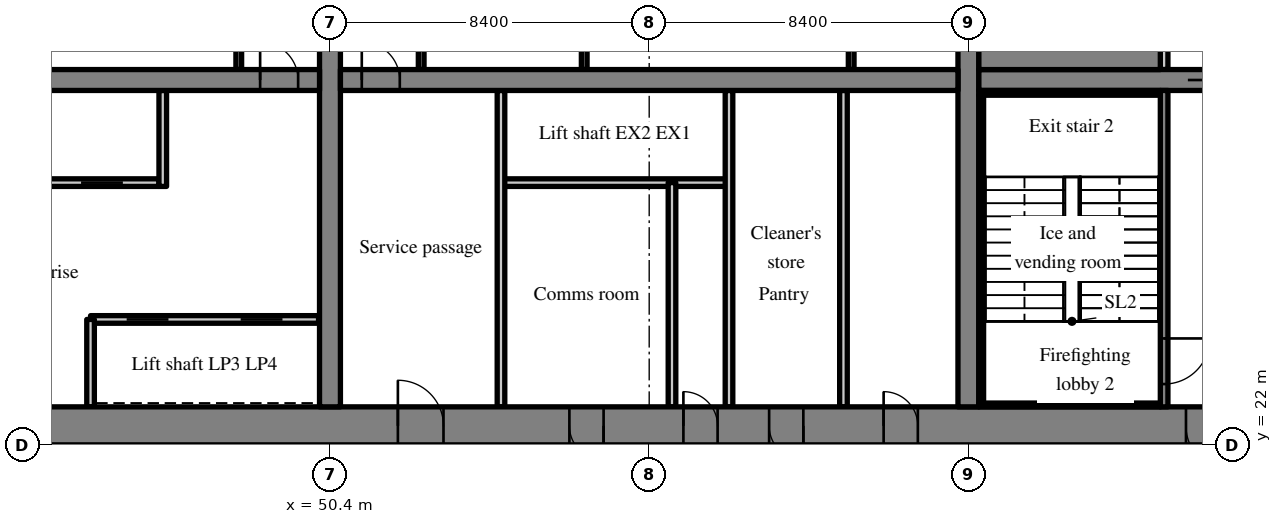
"""IFC4 building model, lengths in metres.
Left out: names, types, materials, properties, quantities, classifications, styles, units other than length and angle.
Written with IfcOpenShell. Run it as: python <this file> out.ifc"""

import sys

from ifc_helpers import new_model, si_unit, direction, frame, frame_2d, origin, place, context, subcontext, project, spatial, rectangle, extrude, source, transform, mapped, element, fill, save


model = new_model("IFC4")
c1 = context("Model", 3, precision=1e-05, world=origin(), true_north=direction((0.0, 1.0)))
c2 = subcontext(c1, "Body", "Model", "MODEL_VIEW")
j1 = project(units=[si_unit("LENGTHUNIT", "METRE"), si_unit("PLANEANGLEUNIT", "RADIAN")], contexts=[c1])
p1 = place(None, origin())
s1 = spatial("IfcSite", under=j1, at=p1, CompositionType="ELEMENT")
p2 = place(p1, origin())
s2 = spatial("IfcBuilding", under=s1, at=p2, CompositionType="ELEMENT")
p3 = place(p2, frame((0.0, 0.0, 58.2)))
s3 = spatial("IfcBuildingStorey", under=s2, at=p3, CompositionType="ELEMENT", Elevation=58.2)
m1 = source(origin(), c2, "Body", "SweptSolid", [
    extrude(rectangle(XDim=50.4, YDim=1.0, at=frame_2d((25.2, 0.0))), origin(), (0.0, 0.0, 1.0), 3.52),
])
p4 = place(p3, frame((25.2, 22.5, 0.0), z_axis=(0.0, 0.0, 1.0), x_axis=(1.0, 0.0, 0.0)))
e1 = element("IfcWall", 1, at=p4, inside=s3, PredefinedType="SHEAR", context=c2, shape_type="MappedRepresentation", body=[
    mapped(m1, transform((0.0, 0.0, 0.0), scale=1.0)),
])
m2 = source(origin(), c2, "Body", "SweptSolid", [
    extrude(rectangle(XDim=1.8, YDim=2.1, at=frame_2d((0.9, 1.05))), frame((0.0, 0.51, 0.0), z_axis=(0.0, -1.0, 0.0), x_axis=(1.0, 0.0, 0.0)), (0.0, 0.0, 1.0), 1.02),
])
p5 = place(p4, frame((15.9, 0.0, 0.0)))
e2 = element("IfcOpeningElement", 2, at=p5, cuts=e1, PredefinedType="OPENING", context=c2, shape_type="MappedRepresentation", body=[
    mapped(m2, transform((0.0, 0.0, 0.0), scale=1.0)),
])
m3 = source(origin(), c2, "Body", "SweptSolid", [
    extrude(rectangle(XDim=1.2, YDim=2.1, at=frame_2d((0.6, 1.05))), frame((0.0, 0.51, 0.0), z_axis=(0.0, -1.0, 0.0), x_axis=(1.0, 0.0, 0.0)), (0.0, 0.0, 1.0), 1.02),
])
p6 = place(p4, frame((26.987, 0.0, 0.0)))
e3 = element("IfcOpeningElement", 3, at=p6, cuts=e1, PredefinedType="OPENING", context=c2, shape_type="MappedRepresentation", body=[
    mapped(m3, transform((0.0, 0.0, 0.0), scale=1.0)),
])
m4 = source(origin(), c2, "Body", "SweptSolid", [
    extrude(rectangle(XDim=0.9, YDim=2.1, at=frame_2d((0.45, 1.05))), frame((0.0, 0.51, 0.0), z_axis=(0.0, -1.0, 0.0), x_axis=(1.0, 0.0, 0.0)), (0.0, 0.0, 1.0), 1.02),
])
p7 = place(p4, frame((34.5, 0.0, 0.0)))
e4 = element("IfcOpeningElement", 4, at=p7, cuts=e1, PredefinedType="OPENING", context=c2, shape_type="MappedRepresentation", body=[
    mapped(m4, transform((0.0, 0.0, 0.0), scale=1.0)),
])
p8 = place(p4, frame((31.5, 0.0, 0.0)))
e5 = element("IfcOpeningElement", 5, at=p8, cuts=e1, PredefinedType="OPENING", context=c2, shape_type="MappedRepresentation", body=[
    mapped(m4, transform((0.0, 0.0, 0.0), scale=1.0)),
])
p9 = place(p4, frame((39.769, 0.0, 0.0)))
e6 = element("IfcOpeningElement", 6, at=p9, cuts=e1, PredefinedType="OPENING", context=c2, shape_type="MappedRepresentation", body=[
    mapped(m4, transform((0.0, 0.0, 0.0), scale=1.0)),
])
p10 = place(p4, frame((36.756, 0.0, 0.0)))
e7 = element("IfcOpeningElement", 7, at=p10, cuts=e1, PredefinedType="OPENING", context=c2, shape_type="MappedRepresentation", body=[
    mapped(m4, transform((0.0, 0.0, 0.0), scale=1.0)),
])
p11 = place(p4, frame((6.438, 0.0, 0.0)))
e8 = element("IfcOpeningElement", 8, at=p11, cuts=e1, PredefinedType="OPENING", context=c2, shape_type="MappedRepresentation", body=[
    mapped(m3, transform((0.0, 0.0, 0.0), scale=1.0)),
])
p12 = place(p4, frame((47.725, 0.0, 0.0)))
e9 = element("IfcOpeningElement", 9, at=p12, cuts=e1, PredefinedType="OPENING", context=c2, shape_type="MappedRepresentation", body=[
    mapped(m3, transform((0.0, 0.0, 0.0), scale=1.0)),
])
m5 = source(origin(), c2, "Body", "SweptSolid", [
    extrude(rectangle(XDim=18.0, YDim=0.55, at=frame_2d((9.0, 0.0))), origin(), (0.0, 0.0, 1.0), 3.52),
])
p13 = place(p3, frame((50.4, 23.0, 0.0), z_axis=(0.0, 0.0, 1.0), x_axis=(0.0, 1.0, 0.0)))
e10 = element("IfcWall", 10, at=p13, inside=s3, PredefinedType="SHEAR", context=c2, shape_type="MappedRepresentation", body=[
    mapped(m5, transform((0.0, 0.0, 0.0), scale=1.0)),
])
m6 = source(origin(), c2, "Body", "SweptSolid", [
    extrude(rectangle(XDim=1.1, YDim=2.1, at=frame_2d((0.55, 1.05))), frame((0.0, 0.285, 0.0), z_axis=(0.0, -1.0, 0.0), x_axis=(1.0, 0.0, 0.0)), (0.0, 0.0, 1.0), 0.57),
])
p14 = place(p13, frame((12.45, 0.0, 0.0)))
e11 = element("IfcOpeningElement", 11, at=p14, cuts=e10, PredefinedType="OPENING", context=c2, shape_type="MappedRepresentation", body=[
    mapped(m6, transform((0.0, 0.0, 0.0), scale=1.0)),
])
p15 = place(p3, frame((67.2, 23.0, 0.0), z_axis=(0.0, 0.0, 1.0), x_axis=(0.0, 1.0, 0.0)))
e12 = element("IfcWall", 12, at=p15, inside=s3, PredefinedType="SHEAR", context=c2, shape_type="MappedRepresentation", body=[
    mapped(m5, transform((0.0, 0.0, 0.0), scale=1.0)),
])
m7 = source(origin(), c2, "Body", "SweptSolid", [
    extrude(rectangle(XDim=16.25, YDim=0.55, at=frame_2d((8.125, 0.0))), origin(), (0.0, 0.0, 1.0), 3.52),
])
p16 = place(p3, frame((33.875, 31.6, 0.0), z_axis=(0.0, 0.0, 1.0), x_axis=(1.0, 0.0, 0.0)))
e13 = element("IfcWall", 13, at=p16, inside=s3, PredefinedType="SHEAR", context=c2, shape_type="MappedRepresentation", body=[
    mapped(m7, transform((0.0, 0.0, 0.0), scale=1.0)),
])
m8 = source(origin(), c2, "Body", "SweptSolid", [
    extrude(rectangle(XDim=1.0, YDim=2.1, at=frame_2d((0.5, 1.05))), frame((0.0, 0.285, 0.0), z_axis=(0.0, -1.0, 0.0), x_axis=(1.0, 0.0, 0.0)), (0.0, 0.0, 1.0), 0.57),
])
p17 = place(p16, frame((14.687, 0.0, 0.0)))
e14 = element("IfcOpeningElement", 14, at=p17, cuts=e13, PredefinedType="OPENING", context=c2, shape_type="MappedRepresentation", body=[
    mapped(m8, transform((0.0, 0.0, 0.0), scale=1.0)),
])
p18 = place(p3, frame((50.675, 31.6, 0.0), z_axis=(0.0, 0.0, 1.0), x_axis=(1.0, 0.0, 0.0)))
e15 = element("IfcWall", 15, at=p18, inside=s3, PredefinedType="SHEAR", context=c2, shape_type="MappedRepresentation", body=[
    mapped(m7, transform((0.0, 0.0, 0.0), scale=1.0)),
])
p19 = place(p18, frame((0.562, 0.0, 0.0)))
e16 = element("IfcOpeningElement", 16, at=p19, cuts=e15, PredefinedType="OPENING", context=c2, shape_type="MappedRepresentation", body=[
    mapped(m8, transform((0.0, 0.0, 0.0), scale=1.0)),
])
m9 = source(origin(), c2, "Body", "SweptSolid", [
    extrude(rectangle(XDim=7.125, YDim=0.55, at=frame_2d((3.562, 0.0))), origin(), (0.0, 0.0, 1.0), 3.52),
])
p20 = place(p3, frame((67.475, 31.6, 0.0), z_axis=(0.0, 0.0, 1.0), x_axis=(1.0, 0.0, 0.0)))
e17 = element("IfcWall", 17, at=p20, inside=s3, PredefinedType="SHEAR", context=c2, shape_type="MappedRepresentation", body=[
    mapped(m9, transform((0.0, 0.0, 0.0), scale=1.0)),
])
p21 = place(p20, frame((5.5, 0.0, 0.0)))
e18 = element("IfcOpeningElement", 18, at=p21, cuts=e17, PredefinedType="OPENING", context=c2, shape_type="MappedRepresentation", body=[
    mapped(m6, transform((0.0, 0.0, 0.0), scale=1.0)),
])
m10 = source(origin(), c2, "Body", "SweptSolid", [
    extrude(rectangle(XDim=6.0, YDim=0.2, at=frame_2d((3.0, 0.0))), origin(), (0.0, 0.0, 1.0), 3.52),
])
p22 = place(p3, frame((44.1, 25.3, 0.0), z_axis=(0.0, 0.0, 1.0), x_axis=(1.0, 0.0, 0.0)))
e19 = element("IfcWall", 19, at=p22, inside=s3, PredefinedType="SOLIDWALL", context=c2, shape_type="MappedRepresentation", body=[
    mapped(m10, transform((0.0, 0.0, 0.0), scale=1.0)),
])
m11 = source(origin(), c2, "Body", "SweptSolid", [
    extrude(rectangle(XDim=1.1, YDim=2.1, at=frame_2d((0.55, 1.05))), frame((0.0, 0.11, 0.0), z_axis=(0.0, -1.0, 0.0), x_axis=(1.0, 0.0, 0.0)), (0.0, 0.0, 1.0), 0.22),
])
p23 = place(p22, frame((0.95, 0.0, 0.0)))
e20 = element("IfcOpeningElement", 20, at=p23, cuts=e19, PredefinedType="OPENING", context=c2, shape_type="MappedRepresentation", body=[
    mapped(m11, transform((0.0, 0.0, 0.0), scale=1.0)),
])
p24 = place(p22, frame((3.95, 0.0, 0.0)))
e21 = element("IfcOpeningElement", 21, at=p24, cuts=e19, PredefinedType="OPENING", context=c2, shape_type="MappedRepresentation", body=[
    mapped(m11, transform((0.0, 0.0, 0.0), scale=1.0)),
])
m12 = source(origin(), c2, "Body", "SweptSolid", [
    extrude(rectangle(XDim=12.025, YDim=0.2, at=frame_2d((6.012, 0.0))), origin(), (0.0, 0.0, 1.0), 3.52),
])
p25 = place(p3, frame((33.875, 28.9, 0.0), z_axis=(0.0, 0.0, 1.0), x_axis=(1.0, 0.0, 0.0)))
e22 = element("IfcWall", 22, at=p25, inside=s3, PredefinedType="SOLIDWALL", context=c2, shape_type="MappedRepresentation", body=[
    mapped(m12, transform((0.0, 0.0, 0.0), scale=1.0)),
])
p26 = place(p25, frame((0.975, 0.0, 0.0)))
e23 = element("IfcOpeningElement", 23, at=p26, cuts=e22, PredefinedType="OPENING", context=c2, shape_type="MappedRepresentation", body=[
    mapped(m11, transform((0.0, 0.0, 0.0), scale=1.0)),
])
p27 = place(p25, frame((3.975, 0.0, 0.0)))
e24 = element("IfcOpeningElement", 24, at=p27, cuts=e22, PredefinedType="OPENING", context=c2, shape_type="MappedRepresentation", body=[
    mapped(m11, transform((0.0, 0.0, 0.0), scale=1.0)),
])
p28 = place(p25, frame((6.975, 0.0, 0.0)))
e25 = element("IfcOpeningElement", 25, at=p28, cuts=e22, PredefinedType="OPENING", context=c2, shape_type="MappedRepresentation", body=[
    mapped(m11, transform((0.0, 0.0, 0.0), scale=1.0)),
])
p29 = place(p25, frame((9.975, 0.0, 0.0)))
e26 = element("IfcOpeningElement", 26, at=p29, cuts=e22, PredefinedType="OPENING", context=c2, shape_type="MappedRepresentation", body=[
    mapped(m11, transform((0.0, 0.0, 0.0), scale=1.0)),
])
m13 = source(origin(), c2, "Body", "SweptSolid", [
    extrude(rectangle(XDim=2.3, YDim=0.2, at=frame_2d((1.15, 0.0))), origin(), (0.0, 0.0, 1.0), 3.52),
])
p30 = place(p3, frame((44.1, 23.0, 0.0), z_axis=(0.0, 0.0, 1.0), x_axis=(0.0, 1.0, 0.0)))
e27 = element("IfcWall", 27, at=p30, inside=s3, PredefinedType="SOLIDWALL", context=c2, shape_type="MappedRepresentation", body=[
    mapped(m13, transform((0.0, 0.0, 0.0), scale=1.0)),
])
m14 = source(origin(), c2, "Body", "SweptSolid", [
    extrude(rectangle(XDim=2.525, YDim=0.2, at=frame_2d((1.262, 0.0))), origin(), (0.0, 0.0, 1.0), 3.52),
])
p31 = place(p3, frame((46.0, 28.8, 0.0), z_axis=(0.0, 0.0, 1.0), x_axis=(0.0, 1.0, 0.0)))
e28 = element("IfcWall", 28, at=p31, inside=s3, PredefinedType="SOLIDWALL", context=c2, shape_type="MappedRepresentation", body=[
    mapped(m14, transform((0.0, 0.0, 0.0), scale=1.0)),
])
m15 = source(origin(), c2, "Body", "SweptSolid", [
    extrude(rectangle(XDim=3.125, YDim=0.15, at=frame_2d((1.562, 0.0))), origin(), (0.0, 0.0, 1.0), 3.52),
])
p32 = place(p3, frame((48.0, 31.875, 0.0), z_axis=(0.0, 0.0, 1.0), x_axis=(0.0, 1.0, 0.0)))
e29 = element("IfcWall", 29, at=p32, inside=s3, PredefinedType="PARTITIONING", context=c2, shape_type="MappedRepresentation", body=[
    mapped(m15, transform((0.0, 0.0, 0.0), scale=1.0)),
])
p33 = place(p3, frame((60.9, 28.9, 0.0), z_axis=(0.0, 0.0, 1.0), x_axis=(-1.0, 0.0, 0.0)))
e30 = element("IfcWall", 30, at=p33, inside=s3, PredefinedType="SOLIDWALL", context=c2, shape_type="MappedRepresentation", body=[
    mapped(m10, transform((0.0, 0.0, 0.0), scale=1.0)),
])
m16 = source(origin(), c2, "Body", "SweptSolid", [
    extrude(rectangle(XDim=8.325, YDim=0.2, at=frame_2d((4.163, 0.0))), origin(), (0.0, 0.0, 1.0), 3.52),
])
for number, where, z_axis, x_axis in (
    (31, (54.9, 23.0, 0.0), (0.0, 0.0, 1.0), (0.0, 1.0, 0.0)),
    (32, (60.9, 23.0, 0.0), (0.0, 0.0, 1.0), (0.0, 1.0, 0.0)),
):
    element("IfcWall", number, at=place(p3, frame(where, z_axis=z_axis, x_axis=x_axis)), inside=s3, PredefinedType="PARTITIONING", context=c2, shape_type="MappedRepresentation", body=[
        mapped(m16, transform((0.0, 0.0, 0.0), scale=1.0)),
    ])
m17 = source(origin(), c2, "Body", "SweptSolid", [
    extrude(rectangle(XDim=5.9, YDim=0.2, at=frame_2d((2.95, 0.0))), origin(), (0.0, 0.0, 1.0), 3.52),
])
p34 = place(p3, frame((59.4, 23.0, 0.0), z_axis=(0.0, 0.0, 1.0), x_axis=(0.0, 1.0, 0.0)))
e33 = element("IfcWall", 33, at=p34, inside=s3, PredefinedType="PARTITIONING", context=c2, shape_type="MappedRepresentation", body=[
    mapped(m17, transform((0.0, 0.0, 0.0), scale=1.0)),
])
p35 = place(p3, frame((63.912, 23.0, 0.0), z_axis=(0.0, 0.0, 1.0), x_axis=(0.0, 1.0, 0.0)))
e34 = element("IfcWall", 34, at=p35, inside=s3, PredefinedType="PARTITIONING", context=c2, shape_type="MappedRepresentation", body=[
    mapped(m16, transform((0.0, 0.0, 0.0), scale=1.0)),
])
for number, where, z_axis, x_axis in (
    (35, (52.8, 31.875, 0.0), (0.0, 0.0, 1.0), (0.0, 1.0, 0.0)),
    (36, (64.115, 31.875, 0.0), (0.0, 0.0, 1.0), (0.0, 1.0, 0.0)),
    (37, (57.09, 31.875, 0.0), (0.0, 0.0, 1.0), (0.0, 1.0, 0.0)),
):
    element("IfcWall", number, at=place(p3, frame(where, z_axis=z_axis, x_axis=x_axis)), inside=s3, PredefinedType="PARTITIONING", context=c2, shape_type="MappedRepresentation", body=[
        mapped(m15, transform((0.0, 0.0, 0.0), scale=1.0)),
    ])
m18 = source(origin(), c2, "Body", "SweptSolid", [
    extrude(rectangle(XDim=8.325, YDim=0.2, at=frame_2d((4.163, 0.0))), origin(), (0.0, 0.0, 1.0), 3.52),
])
p36 = place(p3, frame((72.35, 23.0, 0.0), z_axis=(0.0, 0.0, 1.0), x_axis=(0.0, 1.0, 0.0)))
e38 = element("IfcWall", 38, at=p36, inside=s3, PredefinedType="SOLIDWALL", context=c2, shape_type="MappedRepresentation", body=[
    mapped(m18, transform((0.0, 0.0, 0.0), scale=1.0)),
])
m19 = source(origin(), c2, "Body", "SweptSolid", [
    extrude(rectangle(XDim=1.2, YDim=2.1, at=frame_2d((0.6, 1.05))), frame((0.0, 0.11, 0.0), z_axis=(0.0, -1.0, 0.0), x_axis=(1.0, 0.0, 0.0)), (0.0, 0.0, 1.0), 0.22),
])
p37 = place(p36, frame((0.6, 0.0, 0.0)))
e39 = element("IfcOpeningElement", 39, at=p37, cuts=e38, PredefinedType="OPENING", context=c2, shape_type="MappedRepresentation", body=[
    mapped(m19, transform((0.0, 0.0, 0.0), scale=1.0)),
])
m20 = source(origin(), c2, "Body", "SweptSolid", [
    extrude(rectangle(XDim=1.725, YDim=0.2, at=frame_2d((0.863, 0.0))), origin(), (0.0, 0.0, 1.0), 3.52),
])
p38 = place(p3, frame((72.35, 31.875, 0.0), z_axis=(0.0, 0.0, 1.0), x_axis=(0.0, 1.0, 0.0)))
e40 = element("IfcWall", 40, at=p38, inside=s3, PredefinedType="SOLIDWALL", context=c2, shape_type="MappedRepresentation", body=[
    mapped(m20, transform((0.0, 0.0, 0.0), scale=1.0)),
])
m21 = source(origin(), c2, "Body", "SweptSolid", [
    extrude(rectangle(XDim=4.775, YDim=0.1, at=frame_2d((2.387, 0.0))), origin(), (0.0, 0.0, 1.0), 3.52),
])
p39 = place(p3, frame((67.475, 23.05, 0.0), z_axis=(0.0, 0.0, 1.0), x_axis=(1.0, 0.0, 0.0)))
e41 = element("IfcWall", 41, at=p39, inside=s3, PredefinedType="SOLIDWALL", context=c2, shape_type="MappedRepresentation", body=[
    mapped(m21, transform((0.0, 0.0, 0.0), scale=1.0)),
])
m22 = source(origin(), c2, "Body", "SweptSolid", [
    extrude(rectangle(XDim=4.775, YDim=0.125, at=frame_2d((2.387, 0.0))), origin(), (0.0, 0.0, 1.0), 3.52),
])
p40 = place(p3, frame((67.475, 31.262, 0.0), z_axis=(0.0, 0.0, 1.0), x_axis=(1.0, 0.0, 0.0)))
e42 = element("IfcWall", 42, at=p40, inside=s3, PredefinedType="SOLIDWALL", context=c2, shape_type="MappedRepresentation", body=[
    mapped(m22, transform((0.0, 0.0, 0.0), scale=1.0)),
])
m23 = source(origin(), c2, "Body", "SweptSolid", [
    extrude(rectangle(XDim=8.1, YDim=0.125, at=frame_2d((4.05, 0.0))), origin(), (0.0, 0.0, 1.0), 3.52),
])
p41 = place(p3, frame((67.537, 23.1, 0.0), z_axis=(0.0, 0.0, 1.0), x_axis=(0.0, 1.0, 0.0)))
e43 = element("IfcWall", 43, at=p41, inside=s3, PredefinedType="SOLIDWALL", context=c2, shape_type="MappedRepresentation", body=[
    mapped(m23, transform((0.0, 0.0, 0.0), scale=1.0)),
])
m24 = source(origin(), c2, "Body", "SweptSolid", [
    extrude(rectangle(XDim=4.775, YDim=0.925, at=frame_2d((2.387, 0.0))), origin(), (0.0, 0.0, 1.0), 3.52),
])
p42 = place(p3, frame((67.475, 32.337, 0.0), z_axis=(0.0, 0.0, 1.0), x_axis=(1.0, 0.0, 0.0)))
e44 = element("IfcWall", 44, at=p42, inside=s3, PredefinedType="SOLIDWALL", context=c2, shape_type="MappedRepresentation", body=[
    mapped(m24, transform((0.0, 0.0, 0.0), scale=1.0)),
])
m25 = source(origin(), c2, "Body", "SweptSolid", [
    extrude(rectangle(XDim=1.0, YDim=2.1, at=frame_2d((0.5, 1.05))), frame((0.0, 0.025, 0.0), z_axis=(0.0, -1.0, 0.0), x_axis=(1.0, 0.0, 0.0)), (0.0, 0.0, 1.0), 0.05),
])
p43 = place(p17, origin())
e45 = element("IfcDoor", 45, at=p43, inside=s3, OperationType="SINGLE_SWING_LEFT", PredefinedType="DOOR", context=c2, shape_type="MappedRepresentation", body=[
    mapped(m25, transform((0.0, 0.0, 0.0), scale=1.0)),
])
fill(e14, e45)
m26 = source(origin(), c2, "Body", "SweptSolid", [
    extrude(rectangle(XDim=1.1, YDim=2.1, at=frame_2d((0.55, 1.05))), frame((0.0, 0.025, 0.0), z_axis=(0.0, -1.0, 0.0), x_axis=(1.0, 0.0, 0.0)), (0.0, 0.0, 1.0), 0.05),
])
p44 = place(p23, origin())
e46 = element("IfcDoor", 46, at=p44, inside=s3, OperationType="SLIDING_TO_LEFT", PredefinedType="DOOR", context=c2, shape_type="MappedRepresentation", body=[
    mapped(m26, transform((0.0, 0.0, 0.0), scale=1.0)),
])
fill(e20, e46)
p45 = place(p24, origin())
e47 = element("IfcDoor", 47, at=p45, inside=s3, OperationType="SLIDING_TO_RIGHT", PredefinedType="DOOR", context=c2, shape_type="MappedRepresentation", body=[
    mapped(m26, transform((0.0, 0.0, 0.0), scale=1.0)),
])
fill(e21, e47)
p46 = place(p29, origin())
e48 = element("IfcDoor", 48, at=p46, inside=s3, OperationType="SLIDING_TO_RIGHT", PredefinedType="DOOR", context=c2, shape_type="MappedRepresentation", body=[
    mapped(m26, transform((0.0, 0.0, 0.0), scale=1.0)),
])
fill(e26, e48)
m27 = source(origin(), c2, "Body", "SweptSolid", [
    extrude(rectangle(XDim=1.2, YDim=2.1, at=frame_2d((0.6, 1.05))), frame((0.0, 0.375, 0.0), z_axis=(0.0, -1.0, 0.0), x_axis=(1.0, 0.0, 0.0)), (0.0, 0.0, 1.0), 0.05),
])
p47 = place(p6, origin())
e49 = element("IfcDoor", 49, at=p47, inside=s3, OperationType="SINGLE_SWING_LEFT", PredefinedType="DOOR", context=c2, shape_type="MappedRepresentation", body=[
    mapped(m27, transform((0.0, 0.0, 0.0), scale=1.0)),
])
fill(e3, e49)
p48 = place(p19, origin())
e50 = element("IfcDoor", 50, at=p48, inside=s3, OperationType="SINGLE_SWING_LEFT", PredefinedType="DOOR", context=c2, shape_type="MappedRepresentation", body=[
    mapped(m25, transform((0.0, 0.0, 0.0), scale=1.0)),
])
fill(e16, e50)
m28 = source(origin(), c2, "Body", "SweptSolid", [
    extrude(rectangle(XDim=0.9, YDim=2.1, at=frame_2d((0.45, 1.05))), frame((0.0, 0.375, 0.0), z_axis=(0.0, -1.0, 0.0), x_axis=(1.0, 0.0, 0.0)), (0.0, 0.0, 1.0), 0.05),
])
p49 = place(p7, origin())
e51 = element("IfcDoor", 51, at=p49, inside=s3, OperationType="SINGLE_SWING_LEFT", PredefinedType="DOOR", context=c2, shape_type="MappedRepresentation", body=[
    mapped(m28, transform((0.0, 0.0, 0.0), scale=1.0)),
])
fill(e4, e51)
p50 = place(p8, origin())
e52 = element("IfcDoor", 52, at=p50, inside=s3, OperationType="SINGLE_SWING_RIGHT", PredefinedType="DOOR", context=c2, shape_type="MappedRepresentation", body=[
    mapped(m28, transform((0.0, 0.0, 0.0), scale=1.0)),
])
fill(e5, e52)
p51 = place(p9, origin())
e53 = element("IfcDoor", 53, at=p51, inside=s3, OperationType="SINGLE_SWING_LEFT", PredefinedType="DOOR", context=c2, shape_type="MappedRepresentation", body=[
    mapped(m28, transform((0.0, 0.0, 0.0), scale=1.0)),
])
fill(e6, e53)
p52 = place(p10, origin())
e54 = element("IfcDoor", 54, at=p52, inside=s3, OperationType="SINGLE_SWING_RIGHT", PredefinedType="DOOR", context=c2, shape_type="MappedRepresentation", body=[
    mapped(m28, transform((0.0, 0.0, 0.0), scale=1.0)),
])
fill(e7, e54)
m29 = source(origin(), c2, "Body", "SweptSolid", [
    extrude(rectangle(XDim=1.2, YDim=2.1, at=frame_2d((0.6, 1.05))), frame((0.0, 0.025, 0.0), z_axis=(0.0, -1.0, 0.0), x_axis=(1.0, 0.0, 0.0)), (0.0, 0.0, 1.0), 0.05),
])
p53 = place(p37, origin())
e55 = element("IfcDoor", 55, at=p53, inside=s3, OperationType="SINGLE_SWING_RIGHT", PredefinedType="DOOR", context=c2, shape_type="MappedRepresentation", body=[
    mapped(m29, transform((0.0, 0.0, 0.0), scale=1.0)),
])
fill(e39, e55)
p54 = place(p12, origin())
e56 = element("IfcDoor", 56, at=p54, inside=s3, OperationType="SINGLE_SWING_RIGHT", PredefinedType="DOOR", context=c2, shape_type="MappedRepresentation", body=[
    mapped(m27, transform((0.0, 0.0, 0.0), scale=1.0)),
])
fill(e9, e56)
p55 = place(p21, origin())
e57 = element("IfcDoor", 57, at=p55, inside=s3, OperationType="SLIDING_TO_RIGHT", PredefinedType="DOOR", context=c2, shape_type="MappedRepresentation", body=[
    mapped(m26, transform((0.0, 0.0, 0.0), scale=1.0)),
])
fill(e18, e57)
save(model, sys.argv[1])
